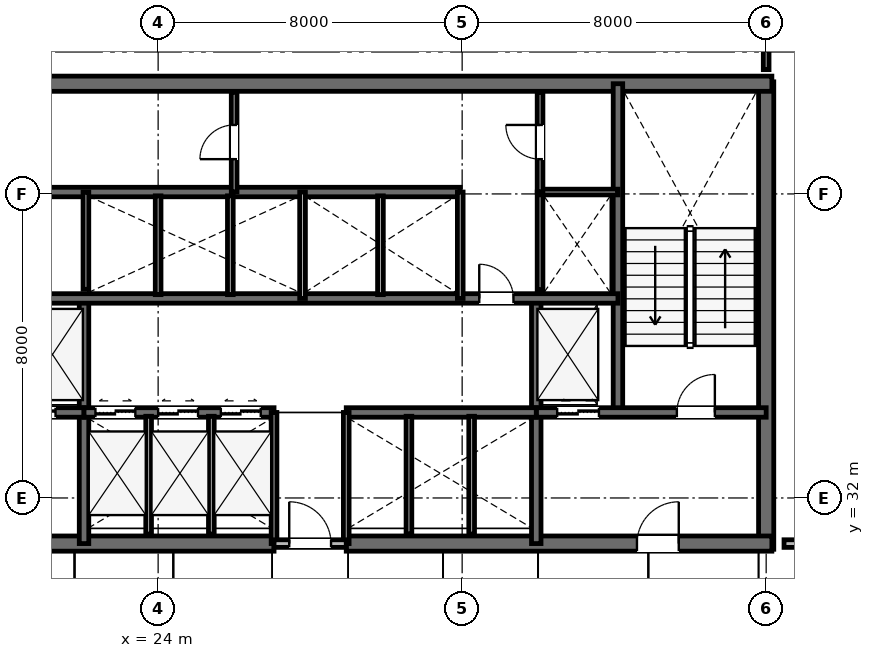
"""IFC4 building model, lengths in metres.
Left out: names, types, materials, properties, quantities, classifications, styles, units other than length and angle.
Written with IfcOpenShell. Run it as: python <this file> out.ifc"""

import sys

from ifc_helpers import new_model, si_unit, direction, frame, frame_2d, origin, place, context, subcontext, project, spatial, rectangle, extrude, element, fill, save


model = new_model("IFC4")
c1 = context("Model", 3, precision=1e-05, world=origin(), true_north=direction((0.0, 1.0)))
c2 = subcontext(c1, "Body", "Model", "MODEL_VIEW")
j1 = project(units=[si_unit("LENGTHUNIT", "METRE"), si_unit("PLANEANGLEUNIT", "RADIAN")], contexts=[c1])
p1 = place(None, origin())
s1 = spatial("IfcSite", under=j1, at=p1, CompositionType="ELEMENT")
p2 = place(p1, origin())
s2 = spatial("IfcBuilding", under=s1, at=p2, CompositionType="ELEMENT")
p3 = place(p2, frame((0.0, 0.0, 51.0)))
s3 = spatial("IfcBuildingStorey", under=s2, at=p3, CompositionType="ELEMENT", Elevation=51.0)
p4 = place(p3, frame((40.0, 30.65, 0.0), z_axis=(0.0, 0.0, 1.0), x_axis=(0.0, 1.0, 0.0)))
e1 = element("IfcWall", 1, at=p4, inside=s3, PredefinedType="SHEAR", context=c2, shape_type="SweptSolid", body=[
    extrude(rectangle(XDim=12.3, YDim=0.4, at=frame_2d((6.15, 0.0))), origin(), (0.0, 0.0, 1.0), 3.6),
])
p5 = place(p3, frame((15.85, 42.9, 0.0), z_axis=(0.0, 0.0, 1.0), x_axis=(1.0, 0.0, 0.0)))
e2 = element("IfcWall", 2, at=p5, inside=s3, PredefinedType="SHEAR", context=c2, shape_type="SweptSolid", body=[
    extrude(rectangle(XDim=24.3, YDim=0.4, at=frame_2d((12.15, 0.0))), origin(), (0.0, 0.0, 1.0), 3.6),
])
p6 = place(p3, frame((15.85, 30.8, 0.0), z_axis=(0.0, 0.0, 1.0), x_axis=(1.0, 0.0, 0.0)))
e3 = element("IfcWall", 3, at=p6, inside=s3, PredefinedType="SHEAR", context=c2, shape_type="SweptSolid", body=[
    extrude(rectangle(XDim=11.2, YDim=0.4, at=frame_2d((5.6, 0.0))), origin(), (0.0, 0.0, 1.0), 3.6),
])
p7 = place(p6, frame((2.45, 0.0, 0.0)))
e4 = element("IfcOpeningElement", 4, at=p7, cuts=e3, PredefinedType="OPENING", context=c2, shape_type="SweptSolid", body=[
    extrude(rectangle(XDim=1.1, YDim=2.15, at=frame_2d((0.55, 1.075))), frame((0.0, 0.21, 0.0), z_axis=(0.0, -1.0, 0.0), x_axis=(1.0, 0.0, 0.0)), (0.0, 0.0, 1.0), 0.42),
])
p8 = place(p3, frame((28.95, 30.8, 0.0), z_axis=(0.0, 0.0, 1.0), x_axis=(1.0, 0.0, 0.0)))
e5 = element("IfcWall", 5, at=p8, inside=s3, PredefinedType="SHEAR", context=c2, shape_type="SweptSolid", body=[
    extrude(rectangle(XDim=11.2, YDim=0.4, at=frame_2d((5.6, 0.0))), origin(), (0.0, 0.0, 1.0), 3.6),
])
p9 = place(p8, frame((7.65, 0.0, 0.0)))
e6 = element("IfcOpeningElement", 6, at=p9, cuts=e5, PredefinedType="OPENING", context=c2, shape_type="SweptSolid", body=[
    extrude(rectangle(XDim=1.1, YDim=2.15, at=frame_2d((0.55, 1.075))), frame((0.0, 0.21, 0.0), z_axis=(0.0, -1.0, 0.0), x_axis=(1.0, 0.0, 0.0)), (0.0, 0.0, 1.0), 0.42),
])
p10 = place(p3, frame((36.1, 34.25, 0.0), z_axis=(0.0, 0.0, 1.0), x_axis=(0.0, 1.0, 0.0)))
e7 = element("IfcWall", 7, at=p10, inside=s3, PredefinedType="SHEAR", context=c2, shape_type="SweptSolid", body=[
    extrude(rectangle(XDim=8.65, YDim=0.25, at=frame_2d((4.325, 0.0))), origin(), (0.0, 0.0, 1.0), 3.6),
])
for number, where, z_axis, x_axis in (
    (8, (22.05, 30.8, 0.0), (0.0, 0.0, 1.0), (0.0, 1.0, 0.0)),
    (9, (33.95, 30.8, 0.0), (0.0, 0.0, 1.0), (0.0, 1.0, 0.0)),
):
    element("IfcWall", number, at=place(p3, frame(where, z_axis=z_axis, x_axis=x_axis)), inside=s3, PredefinedType="SHEAR", context=c2, shape_type="SweptSolid", body=[
        extrude(rectangle(XDim=6.45, YDim=0.25, at=frame_2d((3.225, 0.0))), origin(), (0.0, 0.0, 1.0), 3.6),
    ])
p11 = place(p3, frame((16.0, 34.25, 0.0), z_axis=(0.0, 0.0, 1.0), x_axis=(1.0, 0.0, 0.0)))
e10 = element("IfcWall", 10, at=p11, inside=s3, PredefinedType="SHEAR", context=c2, shape_type="SweptSolid", body=[
    extrude(rectangle(XDim=6.05, YDim=0.25, at=frame_2d((3.025, 0.0))), origin(), (0.0, 0.0, 1.0), 3.6),
])
p12 = place(p11, frame((1.25, 0.0, 0.0)))
e11 = element("IfcOpeningElement", 11, at=p12, cuts=e10, PredefinedType="OPENING", context=c2, shape_type="SweptSolid", body=[
    extrude(rectangle(XDim=1.0, YDim=2.15, at=frame_2d((0.5, 1.075))), frame((0.0, 0.135, 0.0), z_axis=(0.0, -1.0, 0.0), x_axis=(1.0, 0.0, 0.0)), (0.0, 0.0, 1.0), 0.27),
])
p13 = place(p11, frame((4.2, 0.0, 0.0)))
e12 = element("IfcOpeningElement", 12, at=p13, cuts=e10, PredefinedType="OPENING", context=c2, shape_type="SweptSolid", body=[
    extrude(rectangle(XDim=1.1, YDim=2.15, at=frame_2d((0.55, 1.075))), frame((0.0, 0.135, 0.0), z_axis=(0.0, -1.0, 0.0), x_axis=(1.0, 0.0, 0.0)), (0.0, 0.0, 1.0), 0.27),
])
p14 = place(p3, frame((33.95, 34.25, 0.0), z_axis=(0.0, 0.0, 1.0), x_axis=(1.0, 0.0, 0.0)))
e13 = element("IfcWall", 13, at=p14, inside=s3, PredefinedType="SHEAR", context=c2, shape_type="SweptSolid", body=[
    extrude(rectangle(XDim=6.05, YDim=0.25, at=frame_2d((3.025, 0.0))), origin(), (0.0, 0.0, 1.0), 3.6),
])
p15 = place(p14, frame((3.7, 0.0, 0.0)))
e14 = element("IfcOpeningElement", 14, at=p15, cuts=e13, PredefinedType="OPENING", context=c2, shape_type="SweptSolid", body=[
    extrude(rectangle(XDim=1.0, YDim=2.15, at=frame_2d((0.5, 1.075))), frame((0.0, 0.135, 0.0), z_axis=(0.0, -1.0, 0.0), x_axis=(1.0, 0.0, 0.0)), (0.0, 0.0, 1.0), 0.27),
])
p16 = place(p14, frame((0.55, 0.0, 0.0)))
e15 = element("IfcOpeningElement", 15, at=p16, cuts=e13, PredefinedType="OPENING", context=c2, shape_type="SweptSolid", body=[
    extrude(rectangle(XDim=1.1, YDim=2.15, at=frame_2d((0.55, 1.075))), frame((0.0, 0.135, 0.0), z_axis=(0.0, -1.0, 0.0), x_axis=(1.0, 0.0, 0.0)), (0.0, 0.0, 1.0), 0.27),
])
p17 = place(p3, frame((22.05, 34.25, 0.0), z_axis=(0.0, 0.0, 1.0), x_axis=(1.0, 0.0, 0.0)))
e16 = element("IfcWall", 16, at=p17, inside=s3, PredefinedType="SHEAR", context=c2, shape_type="SweptSolid", body=[
    extrude(rectangle(XDim=5.0, YDim=0.25, at=frame_2d((2.5, 0.0))), origin(), (0.0, 0.0, 1.0), 3.6),
])
p18 = place(p17, frame((0.3, 0.0, 0.0)))
e17 = element("IfcOpeningElement", 17, at=p18, cuts=e16, PredefinedType="OPENING", context=c2, shape_type="SweptSolid", body=[
    extrude(rectangle(XDim=1.05, YDim=2.15, at=frame_2d((0.525, 1.075))), frame((0.0, 0.135, 0.0), z_axis=(0.0, -1.0, 0.0), x_axis=(1.0, 0.0, 0.0)), (0.0, 0.0, 1.0), 0.27),
])
p19 = place(p17, frame((1.95, 0.0, 0.0)))
e18 = element("IfcOpeningElement", 18, at=p19, cuts=e16, PredefinedType="OPENING", context=c2, shape_type="SweptSolid", body=[
    extrude(rectangle(XDim=1.05, YDim=2.15, at=frame_2d((0.525, 1.075))), frame((0.0, 0.135, 0.0), z_axis=(0.0, -1.0, 0.0), x_axis=(1.0, 0.0, 0.0)), (0.0, 0.0, 1.0), 0.27),
])
p20 = place(p17, frame((3.6, 0.0, 0.0)))
e19 = element("IfcOpeningElement", 19, at=p20, cuts=e16, PredefinedType="OPENING", context=c2, shape_type="SweptSolid", body=[
    extrude(rectangle(XDim=1.05, YDim=2.15, at=frame_2d((0.525, 1.075))), frame((0.0, 0.135, 0.0), z_axis=(0.0, -1.0, 0.0), x_axis=(1.0, 0.0, 0.0)), (0.0, 0.0, 1.0), 0.27),
])
p21 = place(p3, frame((28.95, 34.25, 0.0), z_axis=(0.0, 0.0, 1.0), x_axis=(1.0, 0.0, 0.0)))
e20 = element("IfcWall", 20, at=p21, inside=s3, PredefinedType="SHEAR", context=c2, shape_type="SweptSolid", body=[
    extrude(rectangle(XDim=5.0, YDim=0.25, at=frame_2d((2.5, 0.0))), origin(), (0.0, 0.0, 1.0), 3.6),
])
p22 = place(p3, frame((19.9, 37.25, 0.0), z_axis=(0.0, 0.0, 1.0), x_axis=(1.0, 0.0, 0.0)))
e21 = element("IfcWall", 21, at=p22, inside=s3, PredefinedType="SHEAR", context=c2, shape_type="SweptSolid", body=[
    extrude(rectangle(XDim=16.2, YDim=0.25, at=frame_2d((8.1, 0.0))), origin(), (0.0, 0.0, 1.0), 3.6),
])
p23 = place(p22, frame((12.55, 0.0, 0.0)))
e22 = element("IfcOpeningElement", 22, at=p23, cuts=e21, PredefinedType="OPENING", context=c2, shape_type="SweptSolid", body=[
    extrude(rectangle(XDim=0.9, YDim=2.15, at=frame_2d((0.45, 1.075))), frame((0.0, 0.135, 0.0), z_axis=(0.0, -1.0, 0.0), x_axis=(1.0, 0.0, 0.0)), (0.0, 0.0, 1.0), 0.27),
])
p24 = place(p3, frame((19.9, 40.05, 0.0), z_axis=(0.0, 0.0, 1.0), x_axis=(1.0, 0.0, 0.0)))
e23 = element("IfcWall", 23, at=p24, inside=s3, PredefinedType="SHEAR", context=c2, shape_type="SweptSolid", body=[
    extrude(rectangle(XDim=12.05, YDim=0.25, at=frame_2d((6.025, 0.0))), origin(), (0.0, 0.0, 1.0), 3.6),
])
for number, where, z_axis, x_axis in (
    (24, (27.05, 30.8, 0.0), (0.0, 0.0, 1.0), (0.0, 1.0, 0.0)),
    (25, (28.95, 30.8, 0.0), (0.0, 0.0, 1.0), (0.0, 1.0, 0.0)),
):
    element("IfcWall", number, at=place(p3, frame(where, z_axis=z_axis, x_axis=x_axis)), inside=s3, PredefinedType="PLUMBINGWALL", context=c2, shape_type="SweptSolid", body=[
        extrude(rectangle(XDim=3.45, YDim=0.15, at=frame_2d((1.725, 0.0))), origin(), (0.0, 0.0, 1.0), 3.33),
    ])
p25 = place(p3, frame((27.05, 30.8, 0.0), z_axis=(0.0, 0.0, 1.0), x_axis=(1.0, 0.0, 0.0)))
e26 = element("IfcWall", 26, at=p25, inside=s3, PredefinedType="PARTITIONING", context=c2, shape_type="SweptSolid", body=[
    extrude(rectangle(XDim=1.9, YDim=0.2, at=frame_2d((0.95, 0.0))), origin(), (0.0, 0.0, 1.0), 3.33),
])
p26 = place(p25, frame((0.4, 0.0, 0.0)))
e27 = element("IfcOpeningElement", 27, at=p26, cuts=e26, PredefinedType="OPENING", context=c2, shape_type="SweptSolid", body=[
    extrude(rectangle(XDim=1.1, YDim=2.15, at=frame_2d((0.55, 1.075))), frame((0.0, 0.11, 0.0), z_axis=(0.0, -1.0, 0.0), x_axis=(1.0, 0.0, 0.0)), (0.0, 0.0, 1.0), 0.22),
])
for number, where, z_axis, x_axis in (
    (28, (23.75, 31.05, 0.0), (0.0, 0.0, 1.0), (0.0, 1.0, 0.0)),
    (29, (25.4, 31.05, 0.0), (0.0, 0.0, 1.0), (0.0, 1.0, 0.0)),
    (30, (30.6, 31.05, 0.0), (0.0, 0.0, 1.0), (0.0, 1.0, 0.0)),
    (31, (32.25, 31.05, 0.0), (0.0, 0.0, 1.0), (0.0, 1.0, 0.0)),
):
    element("IfcWall", number, at=place(p3, frame(where, z_axis=z_axis, x_axis=x_axis)), inside=s3, PredefinedType="PLUMBINGWALL", context=c2, shape_type="SweptSolid", body=[
        extrude(rectangle(XDim=3.1, YDim=0.15, at=frame_2d((1.55, 0.0))), origin(), (0.0, 0.0, 1.0), 3.33),
    ])
p27 = place(p3, frame((22.1, 37.49, 0.0), z_axis=(0.0, 0.0, 1.0), x_axis=(0.0, 1.0, 0.0)))
e32 = element("IfcWall", 32, at=p27, inside=s3, PredefinedType="PLUMBINGWALL", context=c2, shape_type="SweptSolid", body=[
    extrude(rectangle(XDim=2.56, YDim=0.15, at=frame_2d((1.28, 0.0))), origin(), (0.0, 0.0, 1.0), 3.33),
])
p28 = place(p3, frame((27.8, 37.25, 0.0), z_axis=(0.0, 0.0, 1.0), x_axis=(0.0, 1.0, 0.0)))
e33 = element("IfcWall", 33, at=p28, inside=s3, PredefinedType="PLUMBINGWALL", context=c2, shape_type="SweptSolid", body=[
    extrude(rectangle(XDim=2.8, YDim=0.15, at=frame_2d((1.4, 0.0))), origin(), (0.0, 0.0, 1.0), 3.33),
])
for number, where, z_axis, x_axis in (
    (34, (24.0, 37.35, 0.0), (0.0, 0.0, 1.0), (0.0, 1.0, 0.0)),
    (35, (25.9, 37.35, 0.0), (0.0, 0.0, 1.0), (0.0, 1.0, 0.0)),
):
    element("IfcWall", number, at=place(p3, frame(where, z_axis=z_axis, x_axis=x_axis)), inside=s3, PredefinedType="PLUMBINGWALL", context=c2, shape_type="SweptSolid", body=[
        extrude(rectangle(XDim=2.6, YDim=0.15, at=frame_2d((1.3, 0.0))), origin(), (0.0, 0.0, 1.0), 3.33),
    ])
p29 = place(p3, frame((31.95, 37.25, 0.0), z_axis=(0.0, 0.0, 1.0), x_axis=(0.0, 1.0, 0.0)))
e36 = element("IfcWall", 36, at=p29, inside=s3, PredefinedType="PLUMBINGWALL", context=c2, shape_type="SweptSolid", body=[
    extrude(rectangle(XDim=2.8, YDim=0.15, at=frame_2d((1.4, 0.0))), origin(), (0.0, 0.0, 1.0), 3.33),
])
p30 = place(p3, frame((29.85, 37.35, 0.0), z_axis=(0.0, 0.0, 1.0), x_axis=(0.0, 1.0, 0.0)))
e37 = element("IfcWall", 37, at=p30, inside=s3, PredefinedType="PLUMBINGWALL", context=c2, shape_type="SweptSolid", body=[
    extrude(rectangle(XDim=2.6, YDim=0.15, at=frame_2d((1.3, 0.0))), origin(), (0.0, 0.0, 1.0), 3.33),
])
p31 = place(p3, frame((34.05, 37.473, 0.0), z_axis=(0.0, 0.0, 1.0), x_axis=(0.0, 1.0, 0.0)))
e38 = element("IfcWall", 38, at=p31, inside=s3, PredefinedType="PLUMBINGWALL", context=c2, shape_type="SweptSolid", body=[
    extrude(rectangle(XDim=2.577, YDim=0.15, at=frame_2d((1.288, 0.0))), origin(), (0.0, 0.0, 1.0), 3.33),
])
p32 = place(p3, frame((34.05, 40.05, 0.0), z_axis=(0.0, 0.0, 1.0), x_axis=(1.0, 0.0, 0.0)))
e39 = element("IfcWall", 39, at=p32, inside=s3, PredefinedType="PARTITIONING", context=c2, shape_type="SweptSolid", body=[
    extrude(rectangle(XDim=2.05, YDim=0.15, at=frame_2d((1.025, 0.0))), origin(), (0.0, 0.0, 1.0), 3.33),
])
p33 = place(p3, frame((34.05, 40.05, 0.0), z_axis=(0.0, 0.0, 1.0), x_axis=(0.0, 1.0, 0.0)))
e40 = element("IfcWall", 40, at=p33, inside=s3, PredefinedType="PARTITIONING", context=c2, shape_type="SweptSolid", body=[
    extrude(rectangle(XDim=2.63, YDim=0.15, at=frame_2d((1.315, 0.0))), origin(), (0.0, 0.0, 1.0), 3.33),
])
p34 = place(p33, frame((0.865, 0.0, 0.0)))
e41 = element("IfcOpeningElement", 41, at=p34, cuts=e40, PredefinedType="OPENING", context=c2, shape_type="SweptSolid", body=[
    extrude(rectangle(XDim=0.9, YDim=2.15, at=frame_2d((0.45, 1.075))), frame((0.0, 0.085, 0.0), z_axis=(0.0, -1.0, 0.0), x_axis=(1.0, 0.0, 0.0)), (0.0, 0.0, 1.0), 0.17),
])
p35 = place(p3, frame((26.0, 40.05, 0.0), z_axis=(0.0, 0.0, 1.0), x_axis=(0.0, 1.0, 0.0)))
e42 = element("IfcWall", 42, at=p35, inside=s3, PredefinedType="PARTITIONING", context=c2, shape_type="SweptSolid", body=[
    extrude(rectangle(XDim=2.63, YDim=0.15, at=frame_2d((1.315, 0.0))), origin(), (0.0, 0.0, 1.0), 3.33),
])
p36 = place(p35, frame((0.865, 0.0, 0.0)))
e43 = element("IfcOpeningElement", 43, at=p36, cuts=e42, PredefinedType="OPENING", context=c2, shape_type="SweptSolid", body=[
    extrude(rectangle(XDim=0.9, YDim=2.15, at=frame_2d((0.45, 1.075))), frame((0.0, 0.085, 0.0), z_axis=(0.0, -1.0, 0.0), x_axis=(1.0, 0.0, 0.0)), (0.0, 0.0, 1.0), 0.17),
])
p37 = place(p3, frame((40.0, 43.27, 0.0), z_axis=(0.0, 0.0, 1.0), x_axis=(0.0, 1.0, 0.0)))
e44 = element("IfcWall", 44, at=p37, inside=s3, PredefinedType="PARTITIONING", context=c2, shape_type="SweptSolid", body=[
    extrude(rectangle(XDim=4.63, YDim=0.15, at=frame_2d((2.315, 0.0))), origin(), (0.0, 0.0, 1.0), 2.93),
])
p38 = place(p3, frame((40.47, 30.8, 0.0), z_axis=(0.0, 0.0, 1.0), x_axis=(1.0, 0.0, 0.0)))
e45 = element("IfcWall", 45, at=p38, inside=s3, PredefinedType="PARTITIONING", context=c2, shape_type="SweptSolid", body=[
    extrude(rectangle(XDim=15.43, YDim=0.2, at=frame_2d((7.715, 0.0))), origin(), (0.0, 0.0, 1.0), 2.82),
])
p39 = place(p38, frame((6.673, 0.0, 0.0)))
e46 = element("IfcOpeningElement", 46, at=p39, cuts=e45, PredefinedType="OPENING", context=c2, shape_type="SweptSolid", body=[
    extrude(rectangle(XDim=0.95, YDim=2.15, at=frame_2d((0.475, 1.075))), frame((0.0, 0.11, 0.0), z_axis=(0.0, -1.0, 0.0), x_axis=(1.0, 0.0, 0.0)), (0.0, 0.0, 1.0), 0.22),
])
p40 = place(p26, origin())
e47 = element("IfcDoor", 47, at=p40, inside=s3, OperationType="SINGLE_SWING_LEFT", PredefinedType="DOOR", context=c2, shape_type="SweptSolid", body=[
    extrude(rectangle(XDim=1.1, YDim=2.15, at=frame_2d((0.55, 1.075))), frame((0.0, 0.025, 0.0), z_axis=(0.0, -1.0, 0.0), x_axis=(1.0, 0.0, 0.0)), (0.0, 0.0, 1.0), 0.05),
])
fill(e27, e47)
p41 = place(p15, origin())
e48 = element("IfcDoor", 48, at=p41, inside=s3, OperationType="SINGLE_SWING_RIGHT", PredefinedType="DOOR", context=c2, shape_type="SweptSolid", body=[
    extrude(rectangle(XDim=1.0, YDim=2.15, at=frame_2d((0.5, 1.075))), frame((0.0, 0.025, 0.0), z_axis=(0.0, -1.0, 0.0), x_axis=(1.0, 0.0, 0.0)), (0.0, 0.0, 1.0), 0.05),
])
fill(e14, e48)
p42 = place(p9, origin())
e49 = element("IfcDoor", 49, at=p42, inside=s3, OperationType="SINGLE_SWING_RIGHT", PredefinedType="DOOR", context=c2, shape_type="SweptSolid", body=[
    extrude(rectangle(XDim=1.1, YDim=2.15, at=frame_2d((0.55, 1.075))), frame((0.0, 0.025, 0.0), z_axis=(0.0, -1.0, 0.0), x_axis=(1.0, 0.0, 0.0)), (0.0, 0.0, 1.0), 0.05),
])
fill(e6, e49)
p43 = place(p23, origin())
e50 = element("IfcDoor", 50, at=p43, inside=s3, OperationType="SINGLE_SWING_LEFT", PredefinedType="DOOR", context=c2, shape_type="SweptSolid", body=[
    extrude(rectangle(XDim=0.9, YDim=2.15, at=frame_2d((0.45, 1.075))), frame((0.0, 0.025, 0.0), z_axis=(0.0, -1.0, 0.0), x_axis=(1.0, 0.0, 0.0)), (0.0, 0.0, 1.0), 0.05),
])
fill(e22, e50)
p44 = place(p34, origin())
e51 = element("IfcDoor", 51, at=p44, inside=s3, OperationType="SINGLE_SWING_RIGHT", PredefinedType="DOOR", context=c2, shape_type="SweptSolid", body=[
    extrude(rectangle(XDim=0.9, YDim=2.15, at=frame_2d((0.45, 1.075))), frame((0.0, 0.025, 0.0), z_axis=(0.0, -1.0, 0.0), x_axis=(1.0, 0.0, 0.0)), (0.0, 0.0, 1.0), 0.05),
])
fill(e41, e51)
p45 = place(p36, origin())
e52 = element("IfcDoor", 52, at=p45, inside=s3, OperationType="SINGLE_SWING_LEFT", PredefinedType="DOOR", context=c2, shape_type="SweptSolid", body=[
    extrude(rectangle(XDim=0.9, YDim=2.15, at=frame_2d((0.45, 1.075))), frame((0.0, 0.025, 0.0), z_axis=(0.0, -1.0, 0.0), x_axis=(1.0, 0.0, 0.0)), (0.0, 0.0, 1.0), 0.05),
])
fill(e43, e52)
p46 = place(p13, origin())
e53 = element("IfcDoor", 53, at=p46, inside=s3, OperationType="DOUBLE_DOOR_SLIDING", PredefinedType="DOOR", context=c2, shape_type="SweptSolid", body=[
    extrude(rectangle(XDim=1.1, YDim=2.15, at=frame_2d((0.55, 1.075))), frame((0.0, 0.025, 0.0), z_axis=(0.0, -1.0, 0.0), x_axis=(1.0, 0.0, 0.0)), (0.0, 0.0, 1.0), 0.05),
])
fill(e12, e53)
p47 = place(p16, origin())
e54 = element("IfcDoor", 54, at=p47, inside=s3, OperationType="DOUBLE_DOOR_SLIDING", PredefinedType="DOOR", context=c2, shape_type="SweptSolid", body=[
    extrude(rectangle(XDim=1.1, YDim=2.15, at=frame_2d((0.55, 1.075))), frame((0.0, 0.025, 0.0), z_axis=(0.0, -1.0, 0.0), x_axis=(1.0, 0.0, 0.0)), (0.0, 0.0, 1.0), 0.05),
])
fill(e15, e54)
p48 = place(p18, origin())
e55 = element("IfcDoor", 55, at=p48, inside=s3, OperationType="DOUBLE_DOOR_SLIDING", PredefinedType="DOOR", context=c2, shape_type="SweptSolid", body=[
    extrude(rectangle(XDim=1.05, YDim=2.15, at=frame_2d((0.525, 1.075))), frame((0.0, 0.025, 0.0), z_axis=(0.0, -1.0, 0.0), x_axis=(1.0, 0.0, 0.0)), (0.0, 0.0, 1.0), 0.05),
])
fill(e17, e55)
p49 = place(p19, origin())
e56 = element("IfcDoor", 56, at=p49, inside=s3, OperationType="DOUBLE_DOOR_SLIDING", PredefinedType="DOOR", context=c2, shape_type="SweptSolid", body=[
    extrude(rectangle(XDim=1.05, YDim=2.15, at=frame_2d((0.525, 1.075))), frame((0.0, 0.025, 0.0), z_axis=(0.0, -1.0, 0.0), x_axis=(1.0, 0.0, 0.0)), (0.0, 0.0, 1.0), 0.05),
])
fill(e18, e56)
p50 = place(p20, origin())
e57 = element("IfcDoor", 57, at=p50, inside=s3, OperationType="DOUBLE_DOOR_SLIDING", PredefinedType="DOOR", context=c2, shape_type="SweptSolid", body=[
    extrude(rectangle(XDim=1.05, YDim=2.15, at=frame_2d((0.525, 1.075))), frame((0.0, 0.025, 0.0), z_axis=(0.0, -1.0, 0.0), x_axis=(1.0, 0.0, 0.0)), (0.0, 0.0, 1.0), 0.05),
])
fill(e19, e57)
save(model, sys.argv[1])
